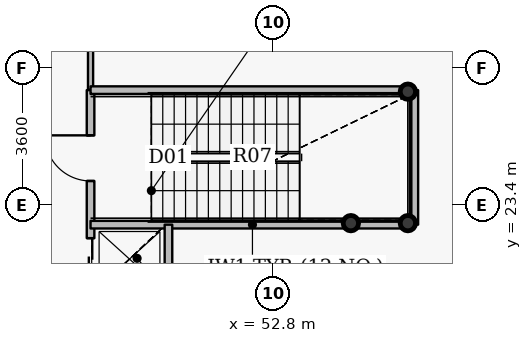
"""IFC4 building model, lengths in metres.
Left out: names, types, materials, properties, quantities, classifications, styles, units other than length and angle.
Written with IfcOpenShell. Run it as: python <this file> out.ifc"""

import sys

from ifc_helpers import new_model, si_unit, direction, frame, frame_2d, origin, origin_2d, place, context, subcontext, project, spatial, rectangle, hollow_circle, extrude, source, transform, mapped, element, fill, save


model = new_model("IFC4")
c1 = context("Model", 3, precision=1e-05, world=origin(), true_north=direction((0.0, 1.0)))
c2 = subcontext(c1, "Body", "Model", "MODEL_VIEW")
j1 = project(units=[si_unit("LENGTHUNIT", "METRE"), si_unit("PLANEANGLEUNIT", "RADIAN")], contexts=[c1])
p1 = place(None, origin())
s1 = spatial("IfcSite", under=j1, at=p1, CompositionType="ELEMENT")
p2 = place(p1, origin())
s2 = spatial("IfcBuilding", under=s1, at=p2, CompositionType="ELEMENT")
p3 = place(p2, frame((0.0, 0.0, 36.6)))
s3 = spatial("IfcBuildingStorey", under=s2, at=p3, CompositionType="ELEMENT", Elevation=36.6)
for number, where, z_axis, x_axis in (
    (1, (56.35, 26.38, 0.0), (0.0, 0.0, 1.0), (1.0, 0.0, 0.0)),
    (2, (56.35, 22.92, 0.0), (0.0, 0.0, 1.0), (1.0, 0.0, 0.0)),
    (3, (54.85, 22.92, 0.0), (0.0, 0.0, 1.0), (1.0, 0.0, 0.0)),
):
    element("IfcColumn", number, at=place(p3, frame(where, z_axis=z_axis, x_axis=x_axis)), inside=s3, PredefinedType="COLUMN", context=c2, shape_type="SweptSolid", body=[
        extrude(hollow_circle(Radius=0.203, WallThickness=0.016, at=origin_2d()), origin(), (0.0, 0.0, 1.0), 4.2),
    ])
p4 = place(p3, frame((48.0, 21.01, 0.0), z_axis=(0.0, 0.0, 1.0), x_axis=(0.0, 1.0, 0.0)))
e4 = element("IfcWall", 4, at=p4, inside=s3, PredefinedType="PARTITIONING", context=c2, shape_type="SweptSolid", body=[
    extrude(rectangle(XDim=5.41, YDim=0.2, at=frame_2d((2.705, 0.0))), origin(), (0.0, 0.0, 1.0), 3.285),
])
p5 = place(p4, frame((3.02, 0.0, 0.0)))
e5 = element("IfcOpeningElement", 5, at=p5, cuts=e4, PredefinedType="OPENING", context=c2, shape_type="SweptSolid", body=[
    extrude(rectangle(XDim=1.2, YDim=2.15, at=origin_2d()), frame((0.6, 0.11, 1.075), z_axis=(0.0, -1.0, 0.0), x_axis=(1.0, 0.0, 0.0)), (0.0, 0.0, 1.0), 0.22),
])
p6 = place(p4, frame((0.465, 0.0, 0.0)))
e6 = element("IfcOpeningElement", 6, at=p6, cuts=e4, PredefinedType="OPENING", context=c2, shape_type="SweptSolid", body=[
    extrude(rectangle(XDim=1.05, YDim=2.15, at=origin_2d()), frame((0.525, 0.11, 1.075), z_axis=(0.0, -1.0, 0.0), x_axis=(1.0, 0.0, 0.0)), (0.0, 0.0, 1.0), 0.22),
])
p7 = place(p3, frame((48.0, 22.88, 0.0), z_axis=(0.0, 0.0, 1.0), x_axis=(1.0, 0.0, 0.0)))
e7 = element("IfcWall", 7, at=p7, inside=s3, PredefinedType="PARTITIONING", context=c2, shape_type="SweptSolid", body=[
    extrude(rectangle(XDim=8.52, YDim=0.2, at=frame_2d((4.26, 0.0))), origin(), (0.0, 0.0, 1.0), 3.95),
])
p8 = place(p3, frame((48.0, 26.43, 0.0), z_axis=(0.0, 0.0, 1.0), x_axis=(0.0, 1.0, 0.0)))
e8 = element("IfcWall", 8, at=p8, inside=s3, PredefinedType="PARTITIONING", context=c2, shape_type="SweptSolid", body=[
    extrude(rectangle(XDim=14.77, YDim=0.135, at=frame_2d((7.385, 0.0))), origin(), (0.0, 0.0, 1.0), 3.285),
])
p9 = place(p8, frame((6.86, 0.0, 0.0)))
e9 = element("IfcOpeningElement", 9, at=p9, cuts=e8, PredefinedType="OPENING", context=c2, shape_type="SweptSolid", body=[
    extrude(rectangle(XDim=1.05, YDim=2.15, at=origin_2d()), frame((0.525, 0.078, 1.075), z_axis=(0.0, -1.0, 0.0), x_axis=(1.0, 0.0, 0.0)), (0.0, 0.0, 1.0), 0.155),
])
p10 = place(p3, frame((48.0, 26.42, 0.0), z_axis=(0.0, 0.0, 1.0), x_axis=(1.0, 0.0, 0.0)))
e10 = element("IfcWall", 10, at=p10, inside=s3, PredefinedType="PARTITIONING", context=c2, shape_type="SweptSolid", body=[
    extrude(rectangle(XDim=8.52, YDim=0.2, at=frame_2d((4.26, 0.0))), origin(), (0.0, 0.0, 1.0), 3.95),
])
p11 = place(p3, frame((50.05, 21.0, 0.0), z_axis=(0.0, 0.0, 1.0), x_axis=(0.0, 1.0, 0.0)))
e11 = element("IfcWall", 11, at=p11, inside=s3, PredefinedType="PARTITIONING", context=c2, shape_type="SweptSolid", body=[
    extrude(rectangle(XDim=1.88, YDim=0.2, at=frame_2d((0.94, 0.0))), origin(), (0.0, 0.0, 1.0), 3.285),
])
p12 = place(p3, frame((56.52, 22.88, 0.0), z_axis=(0.0, 0.0, 1.0), x_axis=(0.0, 1.0, 0.0)))
e12 = element("IfcWall", 12, at=p12, inside=s3, PredefinedType="PARTITIONING", context=c2, shape_type="SweptSolid", body=[
    extrude(rectangle(XDim=3.54, YDim=0.2, at=frame_2d((1.77, 0.0))), origin(), (0.0, 0.0, 1.0), 3.95),
])
m1 = source(origin(), c2, "Body", "SweptSolid", [
    extrude(rectangle(XDim=1.2, YDim=2.15, at=origin_2d()), frame((0.6, 0.025, 1.075), z_axis=(0.0, -1.0, 0.0), x_axis=(1.0, 0.0, 0.0)), (0.0, 0.0, 1.0), 0.05),
])
p13 = place(p5, origin())
e13 = element("IfcDoor", 13, at=p13, inside=s3, OperationType="SINGLE_SWING_RIGHT", PredefinedType="DOOR", context=c2, shape_type="MappedRepresentation", body=[
    mapped(m1, transform((0.0, 0.0, 0.0), x_axis=(1.0, 0.0, 0.0), y_axis=(0.0, 1.0, 0.0), z_axis=(0.0, 0.0, 1.0), scale=1.0)),
])
fill(e5, e13)
m2 = source(origin(), c2, "Body", "SweptSolid", [
    extrude(rectangle(XDim=1.05, YDim=2.15, at=origin_2d()), frame((0.525, 0.025, 1.075), z_axis=(0.0, -1.0, 0.0), x_axis=(1.0, 0.0, 0.0)), (0.0, 0.0, 1.0), 0.05),
])
p14 = place(p6, origin())
e14 = element("IfcDoor", 14, at=p14, inside=s3, OperationType="DOUBLE_DOOR_SLIDING", PredefinedType="USERDEFINED", context=c2, shape_type="MappedRepresentation", body=[
    mapped(m2, transform((0.0, 0.0, 0.0), x_axis=(1.0, 0.0, 0.0), y_axis=(0.0, 1.0, 0.0), z_axis=(0.0, 0.0, 1.0), scale=1.0)),
])
fill(e6, e14)
save(model, sys.argv[1])
